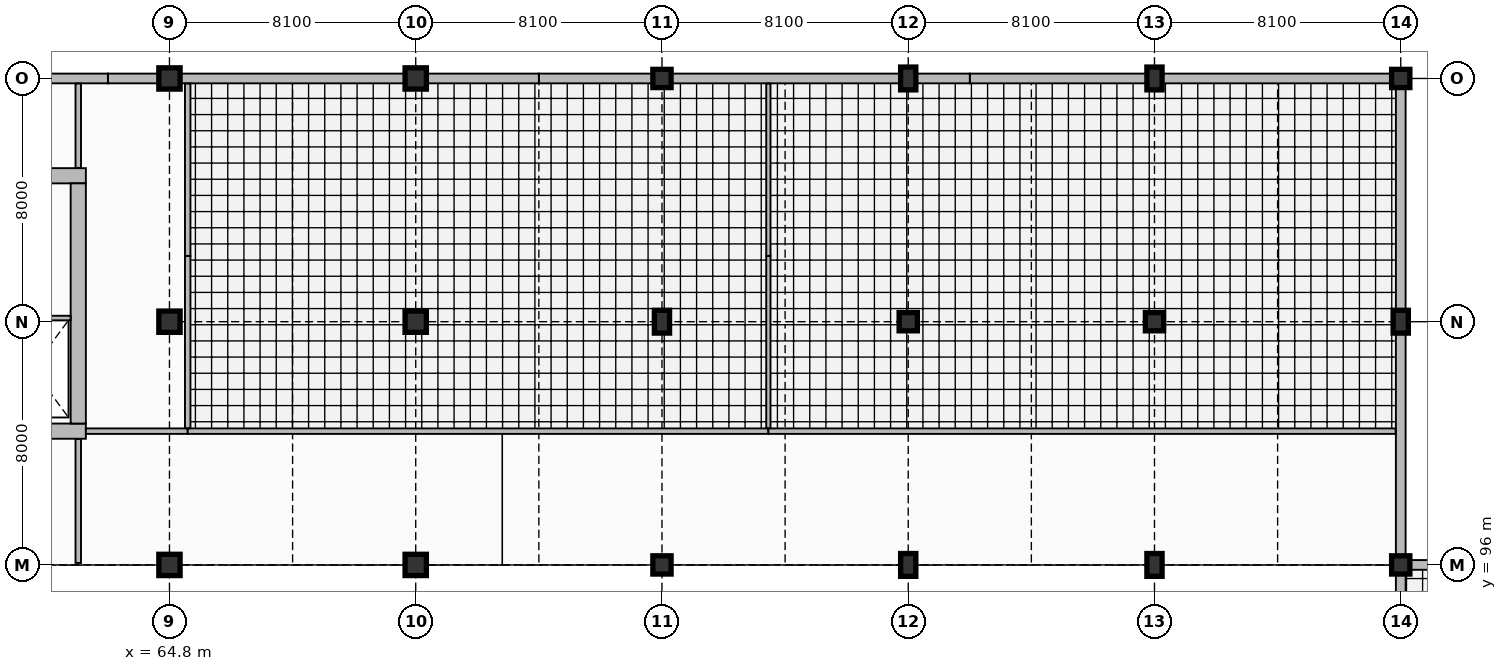
"""IFC4 building model, lengths in metres.
Left out: names, types, materials, properties, quantities, classifications, styles, units other than length and angle.
Written with IfcOpenShell. Run it as: python <this file> out.ifc"""

import sys

from ifc_helpers import new_model, si_unit, direction, frame, frame_2d, origin, origin_2d, place, context, subcontext, project, spatial, rectangle, extrude, element, fill, save


model = new_model("IFC4")
c1 = context("Model", 3, precision=1e-05, world=origin(), true_north=direction((0.0, 1.0)))
c2 = subcontext(c1, "Body", "Model", "MODEL_VIEW")
j1 = project(units=[si_unit("LENGTHUNIT", "METRE"), si_unit("PLANEANGLEUNIT", "RADIAN")], contexts=[c1])
p1 = place(None, origin())
s1 = spatial("IfcSite", under=j1, at=p1, CompositionType="ELEMENT")
p2 = place(p1, origin())
s2 = spatial("IfcBuilding", under=s1, at=p2, CompositionType="ELEMENT")
p3 = place(p2, frame((0.0, 0.0, 10.2)))
s3 = spatial("IfcBuildingStorey", under=s2, at=p3, CompositionType="ELEMENT", Elevation=10.2)
p4 = place(p3, frame((46.75, 100.4, 0.0), z_axis=(0.0, 0.0, 1.0), x_axis=(1.0, 0.0, 0.0)))
e1 = element("IfcWall", 1, at=p4, inside=s3, PredefinedType="SHEAR", context=c2, shape_type="SweptSolid", body=[
    extrude(rectangle(XDim=15.3, YDim=0.5, at=frame_2d((7.65, 0.0))), origin(), (0.0, 0.0, 1.0), 4.5),
])
p5 = place(p4, frame((1.0, 0.0, 0.0)))
e2 = element("IfcOpeningElement", 2, at=p5, cuts=e1, PredefinedType="OPENING", context=c2, shape_type="SweptSolid", body=[
    extrude(rectangle(XDim=1.15, YDim=2.25, at=frame_2d((0.575, 1.125))), frame((0.0, 0.26, 0.0), z_axis=(0.0, -1.0, 0.0), x_axis=(1.0, 0.0, 0.0)), (0.0, 0.0, 1.0), 0.52),
])
p6 = place(p4, frame((10.282, 0.0, 0.0)))
e3 = element("IfcOpeningElement", 3, at=p6, cuts=e1, PredefinedType="OPENING", context=c2, shape_type="SweptSolid", body=[
    extrude(rectangle(XDim=1.1, YDim=2.2, at=frame_2d((0.55, 1.1))), frame((0.0, 0.26, 0.0), z_axis=(0.0, -1.0, 0.0), x_axis=(1.0, 0.0, 0.0)), (0.0, 0.0, 1.0), 0.52),
])
p7 = place(p4, frame((12.998, 0.0, 0.0)))
e4 = element("IfcOpeningElement", 4, at=p7, cuts=e1, PredefinedType="OPENING", context=c2, shape_type="SweptSolid", body=[
    extrude(rectangle(XDim=1.1, YDim=2.2, at=frame_2d((0.55, 1.1))), frame((0.0, 0.26, 0.0), z_axis=(0.0, -1.0, 0.0), x_axis=(1.0, 0.0, 0.0)), (0.0, 0.0, 1.0), 0.52),
])
p8 = place(p3, frame((46.75, 108.8, 0.0), z_axis=(0.0, 0.0, 1.0), x_axis=(1.0, 0.0, 0.0)))
e5 = element("IfcWall", 5, at=p8, inside=s3, PredefinedType="SHEAR", context=c2, shape_type="SweptSolid", body=[
    extrude(rectangle(XDim=15.3, YDim=0.5, at=frame_2d((7.65, 0.0))), origin(), (0.0, 0.0, 1.0), 4.5),
])
p9 = place(p3, frame((61.8, 100.65, 0.0), z_axis=(0.0, 0.0, 1.0), x_axis=(0.0, 1.0, 0.0)))
e6 = element("IfcWall", 6, at=p9, inside=s3, PredefinedType="SHEAR", context=c2, shape_type="SweptSolid", body=[
    extrude(rectangle(XDim=7.9, YDim=0.5, at=frame_2d((3.95, 0.0))), origin(), (0.0, 0.0, 1.0), 4.5),
])
for number, where, z_axis, x_axis in (
    (7, (64.8, 96.0, 0.0), (0.0, 0.0, 1.0), (1.0, 0.0, 0.0)),
    (8, (64.8, 104.0, 0.0), (0.0, 0.0, 1.0), (1.0, 0.0, 0.0)),
    (9, (64.8, 112.0, 0.0), (0.0, 0.0, 1.0), (1.0, 0.0, 0.0)),
    (10, (72.9, 96.0, 0.0), (0.0, 0.0, 1.0), (1.0, 0.0, 0.0)),
    (11, (72.9, 104.0, 0.0), (0.0, 0.0, 1.0), (1.0, 0.0, 0.0)),
    (12, (72.9, 112.0, 0.0), (0.0, 0.0, 1.0), (1.0, 0.0, 0.0)),
):
    element("IfcColumn", number, at=place(p3, frame(where, z_axis=z_axis, x_axis=x_axis)), inside=s3, PredefinedType="COLUMN", context=c2, shape_type="SweptSolid", body=[
        extrude(rectangle(XDim=0.7, YDim=0.7, at=origin_2d()), origin(), (0.0, 0.0, 1.0), 4.5),
    ])
p10 = place(p3, frame((81.0, 96.0, 0.0), z_axis=(0.0, 0.0, 1.0), x_axis=(1.0, 0.0, 0.0)))
e13 = element("IfcColumn", 13, at=p10, inside=s3, PredefinedType="COLUMN", context=c2, shape_type="SweptSolid", body=[
    extrude(rectangle(XDim=0.6, YDim=0.6, at=origin_2d()), origin(), (0.0, 0.0, 1.0), 4.5),
])
p11 = place(p3, frame((81.0, 104.0, 0.0), z_axis=(0.0, 0.0, 1.0), x_axis=(1.0, 0.0, 0.0)))
e14 = element("IfcColumn", 14, at=p11, inside=s3, PredefinedType="COLUMN", context=c2, shape_type="SweptSolid", body=[
    extrude(rectangle(XDim=0.5, YDim=0.75, at=origin_2d()), origin(), (0.0, 0.0, 1.0), 4.5),
])
p12 = place(p3, frame((81.0, 112.0, 0.0), z_axis=(0.0, 0.0, 1.0), x_axis=(1.0, 0.0, 0.0)))
e15 = element("IfcColumn", 15, at=p12, inside=s3, PredefinedType="COLUMN", context=c2, shape_type="SweptSolid", body=[
    extrude(rectangle(XDim=0.6, YDim=0.6, at=origin_2d()), origin(), (0.0, 0.0, 1.0), 4.5),
])
p13 = place(p3, frame((89.1, 96.0, 0.0), z_axis=(0.0, 0.0, 1.0), x_axis=(1.0, 0.0, 0.0)))
e16 = element("IfcColumn", 16, at=p13, inside=s3, PredefinedType="COLUMN", context=c2, shape_type="SweptSolid", body=[
    extrude(rectangle(XDim=0.5, YDim=0.75, at=origin_2d()), origin(), (0.0, 0.0, 1.0), 4.5),
])
p14 = place(p3, frame((89.1, 104.0, 0.0), z_axis=(0.0, 0.0, 1.0), x_axis=(1.0, 0.0, 0.0)))
e17 = element("IfcColumn", 17, at=p14, inside=s3, PredefinedType="COLUMN", context=c2, shape_type="SweptSolid", body=[
    extrude(rectangle(XDim=0.6, YDim=0.6, at=origin_2d()), origin(), (0.0, 0.0, 1.0), 4.5),
])
for number, where, z_axis, x_axis in (
    (18, (89.1, 112.0, 0.0), (0.0, 0.0, 1.0), (1.0, 0.0, 0.0)),
    (19, (97.2, 96.0, 0.0), (0.0, 0.0, 1.0), (1.0, 0.0, 0.0)),
):
    element("IfcColumn", number, at=place(p3, frame(where, z_axis=z_axis, x_axis=x_axis)), inside=s3, PredefinedType="COLUMN", context=c2, shape_type="SweptSolid", body=[
        extrude(rectangle(XDim=0.5, YDim=0.75, at=origin_2d()), origin(), (0.0, 0.0, 1.0), 4.5),
    ])
p15 = place(p3, frame((97.2, 104.0, 0.0), z_axis=(0.0, 0.0, 1.0), x_axis=(1.0, 0.0, 0.0)))
e20 = element("IfcColumn", 20, at=p15, inside=s3, PredefinedType="COLUMN", context=c2, shape_type="SweptSolid", body=[
    extrude(rectangle(XDim=0.6, YDim=0.6, at=origin_2d()), origin(), (0.0, 0.0, 1.0), 4.5),
])
p16 = place(p3, frame((97.2, 112.0, 0.0), z_axis=(0.0, 0.0, 1.0), x_axis=(1.0, 0.0, 0.0)))
e21 = element("IfcColumn", 21, at=p16, inside=s3, PredefinedType="COLUMN", context=c2, shape_type="SweptSolid", body=[
    extrude(rectangle(XDim=0.5, YDim=0.75, at=origin_2d()), origin(), (0.0, 0.0, 1.0), 4.5),
])
p17 = place(p3, frame((105.3, 96.0, 0.0), z_axis=(0.0, 0.0, 1.0), x_axis=(1.0, 0.0, 0.0)))
e22 = element("IfcColumn", 22, at=p17, inside=s3, PredefinedType="COLUMN", context=c2, shape_type="SweptSolid", body=[
    extrude(rectangle(XDim=0.6, YDim=0.6, at=origin_2d()), origin(), (0.0, 0.0, 1.0), 4.5),
])
p18 = place(p3, frame((105.3, 104.0, 0.0), z_axis=(0.0, 0.0, 1.0), x_axis=(1.0, 0.0, 0.0)))
e23 = element("IfcColumn", 23, at=p18, inside=s3, PredefinedType="COLUMN", context=c2, shape_type="SweptSolid", body=[
    extrude(rectangle(XDim=0.5, YDim=0.75, at=origin_2d()), origin(), (0.0, 0.0, 1.0), 4.5),
])
p19 = place(p3, frame((105.3, 112.0, 0.0), z_axis=(0.0, 0.0, 1.0), x_axis=(1.0, 0.0, 0.0)))
e24 = element("IfcColumn", 24, at=p19, inside=s3, PredefinedType="COLUMN", context=c2, shape_type="SweptSolid", body=[
    extrude(rectangle(XDim=0.6, YDim=0.6, at=origin_2d()), origin(), (0.0, 0.0, 1.0), 4.5),
])
p20 = place(p3, frame((117.54, 96.0, 0.0), z_axis=(0.0, 0.0, 1.0), x_axis=(-1.0, 0.0, 0.0)))
e25 = element("IfcWall", 25, at=p20, inside=s3, PredefinedType="SOLIDWALL", context=c2, shape_type="SweptSolid", body=[
    extrude(rectangle(XDim=12.06, YDim=0.32, at=frame_2d((6.03, 0.0))), origin(), (0.0, 0.0, 1.0), 3.544),
])
p21 = place(p20, frame((6.3, 0.0, 0.95)))
e26 = element("IfcOpeningElement", 26, at=p21, cuts=e25, PredefinedType="OPENING", context=c2, shape_type="SweptSolid", body=[
    extrude(rectangle(XDim=3.6, YDim=0.9, at=frame_2d((1.8, 0.45))), frame((0.0, 0.17, 0.0), z_axis=(0.0, -1.0, 0.0), x_axis=(1.0, 0.0, 0.0)), (0.0, 0.0, 1.0), 0.34),
])
p22 = place(p3, frame((105.3, 96.18, 0.0), z_axis=(0.0, 0.0, 1.0), x_axis=(0.0, 1.0, 0.0)))
e27 = element("IfcWall", 27, at=p22, inside=s3, PredefinedType="SOLIDWALL", context=c2, shape_type="SweptSolid", body=[
    extrude(rectangle(XDim=15.82, YDim=0.32, at=frame_2d((7.91, 0.0))), origin(), (0.0, 0.0, 1.0), 3.732),
])
p23 = place(p22, frame((9.45, 0.0, 0.95)))
e28 = element("IfcOpeningElement", 28, at=p23, cuts=e27, PredefinedType="OPENING", context=c2, shape_type="SweptSolid", body=[
    extrude(rectangle(XDim=1.6, YDim=1.4, at=frame_2d((0.8, 0.7))), frame((0.0, 0.17, 0.0), z_axis=(0.0, -1.0, 0.0), x_axis=(1.0, 0.0, 0.0)), (0.0, 0.0, 1.0), 0.34),
])
p24 = place(p3, frame((105.3, 112.0, 0.0), z_axis=(0.0, 0.0, 1.0), x_axis=(-1.0, 0.0, 0.0)))
e29 = element("IfcWall", 29, at=p24, inside=s3, PredefinedType="SOLIDWALL", context=c2, shape_type="SweptSolid", body=[
    extrude(rectangle(XDim=14.175, YDim=0.32, at=frame_2d((7.087, 0.0))), origin(), (0.0, 0.0, 1.0), 3.632),
])
p25 = place(p24, frame((4.5, 0.0, 0.95)))
e30 = element("IfcOpeningElement", 30, at=p25, cuts=e29, PredefinedType="OPENING", context=c2, shape_type="SweptSolid", body=[
    extrude(rectangle(XDim=0.9, YDim=1.8, at=frame_2d((0.45, 0.9))), frame((0.0, 0.17, 0.0), z_axis=(0.0, -1.0, 0.0), x_axis=(1.0, 0.0, 0.0)), (0.0, 0.0, 1.0), 0.34),
])
p26 = place(p3, frame((91.125, 112.0, 0.0), z_axis=(0.0, 0.0, 1.0), x_axis=(-1.0, 0.0, 0.0)))
e31 = element("IfcWall", 31, at=p26, inside=s3, PredefinedType="SOLIDWALL", context=c2, shape_type="SweptSolid", body=[
    extrude(rectangle(XDim=14.175, YDim=0.32, at=frame_2d((7.087, 0.0))), origin(), (0.0, 0.0, 1.0), 3.632),
])
p27 = place(p26, frame((4.5, 0.0, 0.85)))
e32 = element("IfcOpeningElement", 32, at=p27, cuts=e31, PredefinedType="OPENING", context=c2, shape_type="SweptSolid", body=[
    extrude(rectangle(XDim=0.9, YDim=2.1, at=frame_2d((0.45, 1.05))), frame((0.0, 0.17, 0.0), z_axis=(0.0, -1.0, 0.0), x_axis=(1.0, 0.0, 0.0)), (0.0, 0.0, 1.0), 0.34),
])
p28 = place(p3, frame((76.95, 112.0, 0.0), z_axis=(0.0, 0.0, 1.0), x_axis=(-1.0, 0.0, 0.0)))
e33 = element("IfcWall", 33, at=p28, inside=s3, PredefinedType="SOLIDWALL", context=c2, shape_type="SweptSolid", body=[
    extrude(rectangle(XDim=14.175, YDim=0.32, at=frame_2d((7.087, 0.0))), origin(), (0.0, 0.0, 1.0), 3.632),
])
p29 = place(p28, frame((6.75, 0.0, 0.85)))
e34 = element("IfcOpeningElement", 34, at=p29, cuts=e33, PredefinedType="OPENING", context=c2, shape_type="SweptSolid", body=[
    extrude(rectangle(XDim=0.9, YDim=2.4, at=frame_2d((0.45, 1.2))), frame((0.0, 0.17, 0.0), z_axis=(0.0, -1.0, 0.0), x_axis=(1.0, 0.0, 0.0)), (0.0, 0.0, 1.0), 0.34),
])
p30 = place(p3, frame((62.775, 112.0, 0.0), z_axis=(0.0, 0.0, 1.0), x_axis=(-1.0, 0.0, 0.0)))
e35 = element("IfcWall", 35, at=p30, inside=s3, PredefinedType="SOLIDWALL", context=c2, shape_type="SweptSolid", body=[
    extrude(rectangle(XDim=14.175, YDim=0.32, at=frame_2d((7.087, 0.0))), origin(), (0.0, 0.0, 1.0), 3.632),
])
p31 = place(p30, frame((8.55, 0.0, 0.95)))
e36 = element("IfcOpeningElement", 36, at=p31, cuts=e35, PredefinedType="OPENING", context=c2, shape_type="SweptSolid", body=[
    extrude(rectangle(XDim=1.2, YDim=1.8, at=frame_2d((0.6, 0.9))), frame((0.0, 0.17, 0.0), z_axis=(0.0, -1.0, 0.0), x_axis=(1.0, 0.0, 0.0)), (0.0, 0.0, 1.0), 0.34),
])
p32 = place(p3, frame((105.3, 95.82, 0.0), z_axis=(0.0, 0.0, 1.0), x_axis=(0.0, -1.0, 0.0)))
e37 = element("IfcWall", 37, at=p32, inside=s3, PredefinedType="SOLIDWALL", context=c2, shape_type="SweptSolid", body=[
    extrude(rectangle(XDim=15.82, YDim=0.32, at=frame_2d((7.91, 0.0))), origin(), (0.0, 0.0, 1.0), 3.769),
])
p33 = place(p3, frame((56.3, 104.12, 0.0), z_axis=(0.0, 0.0, 1.0), x_axis=(1.0, 0.0, 0.0)))
e38 = element("IfcWall", 38, at=p33, inside=s3, PredefinedType="PARTITIONING", context=c2, shape_type="SweptSolid", body=[
    extrude(rectangle(XDim=5.25, YDim=0.15, at=frame_2d((2.625, 0.0))), origin(), (0.0, 0.0, 1.0), 4.24),
])
p34 = place(p3, frame((62.05, 100.4, 0.0), z_axis=(0.0, 0.0, 1.0), x_axis=(1.0, 0.0, 0.0)))
e39 = element("IfcWall", 39, at=p34, inside=s3, PredefinedType="PARTITIONING", context=c2, shape_type="SweptSolid", body=[
    extrude(rectangle(XDim=3.35, YDim=0.18, at=frame_2d((1.675, 0.0))), origin(), (0.0, 0.0, 1.0), 4.24),
])
p35 = place(p34, frame((1.075, 0.0, 0.0)))
e40 = element("IfcOpeningElement", 40, at=p35, cuts=e39, PredefinedType="OPENING", context=c2, shape_type="SweptSolid", body=[
    extrude(rectangle(XDim=1.2, YDim=2.2, at=frame_2d((0.6, 1.1))), frame((0.0, 0.1, 0.0), z_axis=(0.0, -1.0, 0.0), x_axis=(1.0, 0.0, 0.0)), (0.0, 0.0, 1.0), 0.2),
])
p36 = place(p3, frame((65.4, 100.4, 0.0), z_axis=(0.0, 0.0, 1.0), x_axis=(1.0, 0.0, 0.0)))
e41 = element("IfcWall", 41, at=p36, inside=s3, PredefinedType="PARTITIONING", context=c2, shape_type="SweptSolid", body=[
    extrude(rectangle(XDim=19.1, YDim=0.18, at=frame_2d((9.55, 0.0))), origin(), (0.0, 0.0, 1.0), 4.24),
])
p37 = place(p36, frame((8.95, 0.0, 0.0)))
e42 = element("IfcOpeningElement", 42, at=p37, cuts=e41, PredefinedType="OPENING", context=c2, shape_type="SweptSolid", body=[
    extrude(rectangle(XDim=1.2, YDim=2.3, at=frame_2d((0.6, 1.15))), frame((0.0, 0.1, 0.0), z_axis=(0.0, -1.0, 0.0), x_axis=(1.0, 0.0, 0.0)), (0.0, 0.0, 1.0), 0.2),
])
p38 = place(p3, frame((84.5, 100.4, 0.0), z_axis=(0.0, 0.0, 1.0), x_axis=(1.0, 0.0, 0.0)))
e43 = element("IfcWall", 43, at=p38, inside=s3, PredefinedType="PARTITIONING", context=c2, shape_type="SweptSolid", body=[
    extrude(rectangle(XDim=20.632, YDim=0.18, at=frame_2d((10.316, 0.0))), origin(), (0.0, 0.0, 1.0), 4.24),
])
p39 = place(p38, frame((9.716, 0.0, 0.0)))
e44 = element("IfcOpeningElement", 44, at=p39, cuts=e43, PredefinedType="OPENING", context=c2, shape_type="SweptSolid", body=[
    extrude(rectangle(XDim=1.2, YDim=2.3, at=frame_2d((0.6, 1.15))), frame((0.0, 0.1, 0.0), z_axis=(0.0, -1.0, 0.0), x_axis=(1.0, 0.0, 0.0)), (0.0, 0.0, 1.0), 0.2),
])
p40 = place(p3, frame((61.8, 96.065, 0.0), z_axis=(0.0, 0.0, 1.0), x_axis=(0.0, 1.0, 0.0)))
e45 = element("IfcWall", 45, at=p40, inside=s3, PredefinedType="PARTITIONING", context=c2, shape_type="SweptSolid", body=[
    extrude(rectangle(XDim=4.077, YDim=0.18, at=frame_2d((2.039, 0.0))), origin(), (0.0, 0.0, 1.0), 4.24),
])
p41 = place(p40, frame((1.489, 0.0, 0.0)))
e46 = element("IfcOpeningElement", 46, at=p41, cuts=e45, PredefinedType="OPENING", context=c2, shape_type="SweptSolid", body=[
    extrude(rectangle(XDim=1.1, YDim=2.2, at=frame_2d((0.55, 1.1))), frame((0.0, 0.1, 0.0), z_axis=(0.0, -1.0, 0.0), x_axis=(1.0, 0.0, 0.0)), (0.0, 0.0, 1.0), 0.2),
])
p42 = place(p3, frame((61.8, 109.058, 0.0), z_axis=(0.0, 0.0, 1.0), x_axis=(0.0, 1.0, 0.0)))
e47 = element("IfcWall", 47, at=p42, inside=s3, PredefinedType="PARTITIONING", context=c2, shape_type="SweptSolid", body=[
    extrude(rectangle(XDim=2.774, YDim=0.18, at=frame_2d((1.387, 0.0))), origin(), (0.0, 0.0, 1.0), 4.24),
])
p43 = place(p42, frame((0.837, 0.0, 0.0)))
e48 = element("IfcOpeningElement", 48, at=p43, cuts=e47, PredefinedType="OPENING", context=c2, shape_type="SweptSolid", body=[
    extrude(rectangle(XDim=1.1, YDim=2.2, at=frame_2d((0.55, 1.1))), frame((0.0, 0.1, 0.0), z_axis=(0.0, -1.0, 0.0), x_axis=(1.0, 0.0, 0.0)), (0.0, 0.0, 1.0), 0.2),
])
for number, where, z_axis, x_axis in (
    (49, (65.4, 100.498, 0.0), (0.0, 0.0, 1.0), (0.0, 1.0, 0.0)),
    (50, (65.4, 106.165, 0.0), (0.0, 0.0, 1.0), (0.0, 1.0, 0.0)),
):
    element("IfcWall", number, at=place(p3, frame(where, z_axis=z_axis, x_axis=x_axis)), inside=s3, PredefinedType="PARTITIONING", context=c2, shape_type="SweptSolid", body=[
        extrude(rectangle(XDim=5.667, YDim=0.18, at=frame_2d((2.833, 0.0))), origin(), (0.0, 0.0, 1.0), 4.24),
    ])
for number, where, z_axis, x_axis in (
    (51, (84.5, 100.498, 0.0), (0.0, 0.0, 1.0), (0.0, 1.0, 0.0)),
    (52, (84.5, 106.165, 0.0), (0.0, 0.0, 1.0), (0.0, 1.0, 0.0)),
):
    element("IfcWall", number, at=place(p3, frame(where, z_axis=z_axis, x_axis=x_axis)), inside=s3, PredefinedType="PARTITIONING", context=c2, shape_type="SweptSolid", body=[
        extrude(rectangle(XDim=5.667, YDim=0.14, at=frame_2d((2.833, 0.0))), origin(), (0.0, 0.0, 1.0), 4.24),
    ])
p44 = place(p23, origin())
e53 = element("IfcWindow", 53, at=p44, inside=s3, PartitioningType="SINGLE_PANEL", PredefinedType="WINDOW", context=c2, shape_type="SweptSolid", body=[
    extrude(rectangle(XDim=1.6, YDim=1.4, at=frame_2d((0.8, 0.7))), frame((0.0, 0.03, 0.0), z_axis=(0.0, -1.0, 0.0), x_axis=(1.0, 0.0, 0.0)), (0.0, 0.0, 1.0), 0.06),
])
fill(e28, e53)
p45 = place(p25, origin())
e54 = element("IfcWindow", 54, at=p45, inside=s3, PartitioningType="SINGLE_PANEL", PredefinedType="WINDOW", context=c2, shape_type="SweptSolid", body=[
    extrude(rectangle(XDim=0.9, YDim=1.8, at=frame_2d((0.45, 0.9))), frame((0.0, 0.03, 0.0), z_axis=(0.0, -1.0, 0.0), x_axis=(1.0, 0.0, 0.0)), (0.0, 0.0, 1.0), 0.06),
])
fill(e30, e54)
p46 = place(p27, origin())
e55 = element("IfcWindow", 55, at=p46, inside=s3, PartitioningType="SINGLE_PANEL", PredefinedType="WINDOW", context=c2, shape_type="SweptSolid", body=[
    extrude(rectangle(XDim=0.9, YDim=2.1, at=frame_2d((0.45, 1.05))), frame((0.0, 0.03, 0.0), z_axis=(0.0, -1.0, 0.0), x_axis=(1.0, 0.0, 0.0)), (0.0, 0.0, 1.0), 0.06),
])
fill(e32, e55)
p47 = place(p29, origin())
e56 = element("IfcWindow", 56, at=p47, inside=s3, PartitioningType="DOUBLE_PANEL_HORIZONTAL", PredefinedType="WINDOW", context=c2, shape_type="SweptSolid", body=[
    extrude(rectangle(XDim=0.9, YDim=2.4, at=frame_2d((0.45, 1.2))), frame((0.0, 0.03, 0.0), z_axis=(0.0, -1.0, 0.0), x_axis=(1.0, 0.0, 0.0)), (0.0, 0.0, 1.0), 0.06),
])
fill(e34, e56)
p48 = place(p35, frame((1.2, 0.0, 0.0), z_axis=(0.0, 0.0, 1.0), x_axis=(-1.0, 0.0, 0.0)))
e57 = element("IfcDoor", 57, at=p48, inside=s3, OperationType="SINGLE_SWING_LEFT", PredefinedType="DOOR", context=c2, shape_type="SweptSolid", body=[
    extrude(rectangle(XDim=1.2, YDim=2.2, at=frame_2d((0.6, 1.1))), frame((0.0, 0.025, 0.0), z_axis=(0.0, -1.0, 0.0), x_axis=(1.0, 0.0, 0.0)), (0.0, 0.0, 1.0), 0.05),
])
fill(e40, e57)
p49 = place(p37, origin())
e58 = element("IfcDoor", 58, at=p49, inside=s3, OperationType="SINGLE_SWING_RIGHT", PredefinedType="DOOR", context=c2, shape_type="SweptSolid", body=[
    extrude(rectangle(XDim=1.2, YDim=2.3, at=frame_2d((0.6, 1.15))), frame((0.0, 0.025, 0.0), z_axis=(0.0, -1.0, 0.0), x_axis=(1.0, 0.0, 0.0)), (0.0, 0.0, 1.0), 0.05),
])
fill(e42, e58)
p50 = place(p39, origin())
e59 = element("IfcDoor", 59, at=p50, inside=s3, OperationType="SINGLE_SWING_LEFT", PredefinedType="DOOR", context=c2, shape_type="SweptSolid", body=[
    extrude(rectangle(XDim=1.2, YDim=2.3, at=frame_2d((0.6, 1.15))), frame((0.0, 0.025, 0.0), z_axis=(0.0, -1.0, 0.0), x_axis=(1.0, 0.0, 0.0)), (0.0, 0.0, 1.0), 0.05),
])
fill(e44, e59)
p51 = place(p41, frame((1.1, 0.0, 0.0), z_axis=(0.0, 0.0, 1.0), x_axis=(-1.0, 0.0, 0.0)))
e60 = element("IfcDoor", 60, at=p51, inside=s3, OperationType="SINGLE_SWING_LEFT", PredefinedType="DOOR", context=c2, shape_type="SweptSolid", body=[
    extrude(rectangle(XDim=1.1, YDim=2.2, at=frame_2d((0.55, 1.1))), frame((0.0, 0.025, 0.0), z_axis=(0.0, -1.0, 0.0), x_axis=(1.0, 0.0, 0.0)), (0.0, 0.0, 1.0), 0.05),
])
fill(e46, e60)
p52 = place(p43, origin())
e61 = element("IfcDoor", 61, at=p52, inside=s3, OperationType="SINGLE_SWING_RIGHT", PredefinedType="DOOR", context=c2, shape_type="SweptSolid", body=[
    extrude(rectangle(XDim=1.1, YDim=2.2, at=frame_2d((0.55, 1.1))), frame((0.0, 0.025, 0.0), z_axis=(0.0, -1.0, 0.0), x_axis=(1.0, 0.0, 0.0)), (0.0, 0.0, 1.0), 0.05),
])
fill(e48, e61)
save(model, sys.argv[1])
